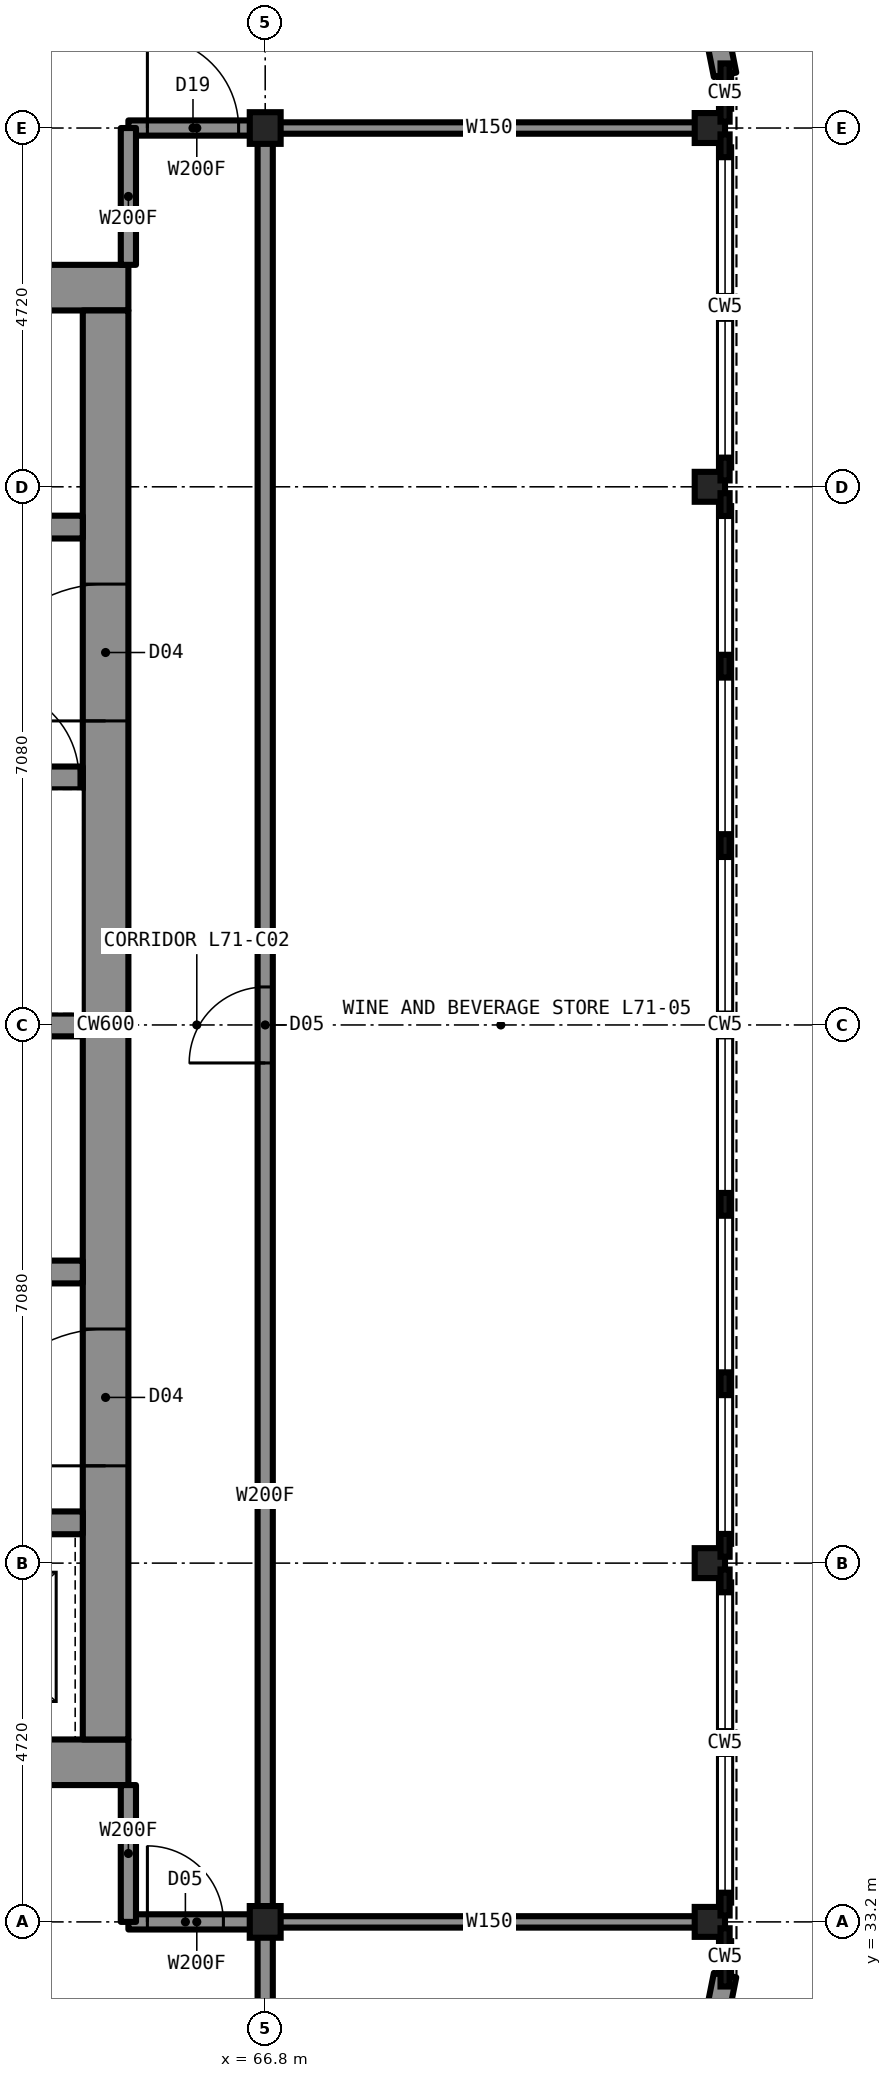
"""IFC4 building model, lengths in metres.
Left out: names, types, materials, properties, quantities, classifications, styles, units other than length and angle.
Written with IfcOpenShell. Run it as: python <this file> out.ifc"""

import sys

from ifc_helpers import new_model, si_unit, direction, frame, frame_2d, origin, origin_2d, place, context, subcontext, project, spatial, rectangle, i_section, extrude, element, fill, save


model = new_model("IFC4")
c1 = context("Model", 3, precision=1e-05, world=origin(), true_north=direction((0.0, 1.0)))
c2 = subcontext(c1, "Body", "Model", "MODEL_VIEW")
j1 = project(units=[si_unit("LENGTHUNIT", "METRE"), si_unit("PLANEANGLEUNIT", "RADIAN")], contexts=[c1])
p1 = place(None, origin())
s1 = spatial("IfcSite", under=j1, at=p1, CompositionType="ELEMENT")
p2 = place(p1, origin())
s2 = spatial("IfcBuilding", under=s1, at=p2, CompositionType="ELEMENT")
p3 = place(p2, frame((0.0, 0.0, 261.7)))
s3 = spatial("IfcBuildingStorey", under=s2, at=p3, CompositionType="ELEMENT", Elevation=261.7)
for number, where, z_axis, x_axis in (
    (1, (72.65, 33.2, 0.0), (0.0, 0.0, 1.0), (1.0, 0.0, 0.0)),
    (2, (72.65, 37.92, 0.0), (0.0, 0.0, 1.0), (1.0, 0.0, 0.0)),
    (3, (72.65, 52.08, 0.0), (0.0, 0.0, 1.0), (1.0, 0.0, 0.0)),
    (4, (72.65, 56.8, 0.0), (0.0, 0.0, 1.0), (1.0, 0.0, 0.0)),
):
    element("IfcColumn", number, at=place(p3, frame(where, z_axis=z_axis, x_axis=x_axis)), inside=s3, PredefinedType="COLUMN", context=c2, shape_type="SweptSolid", body=[
        extrude(i_section(OverallWidth=0.399, OverallDepth=0.394, WebThickness=0.023, FlangeThickness=0.037, at=origin_2d()), origin(), (0.0, 0.0, 1.0), 5.0),
    ])
for number, where, z_axis, x_axis in (
    (5, (66.8, 33.2, 0.0), (0.0, 0.0, 1.0), (1.0, 0.0, 0.0)),
    (6, (66.8, 56.8, 0.0), (0.0, 0.0, 1.0), (1.0, 0.0, 0.0)),
):
    element("IfcColumn", number, at=place(p3, frame(where, z_axis=z_axis, x_axis=x_axis)), inside=s3, PredefinedType="COLUMN", context=c2, shape_type="SweptSolid", body=[
        extrude(i_section(OverallWidth=0.406, OverallDepth=0.417, WebThickness=0.03, FlangeThickness=0.048, at=origin_2d()), origin(), (0.0, 0.0, 1.0), 5.0),
    ])
for number, where, z_axis, x_axis in (
    (7, (45.0, 54.7, 0.0), (0.0, 0.0, 1.0), (1.0, 0.0, 0.0)),
    (8, (45.0, 35.3, 0.0), (0.0, 0.0, 1.0), (1.0, 0.0, 0.0)),
):
    element("IfcWall", number, at=place(p3, frame(where, z_axis=z_axis, x_axis=x_axis)), inside=s3, PredefinedType="SHEAR", context=c2, shape_type="SweptSolid", body=[
        extrude(rectangle(XDim=20.0, YDim=0.6, at=frame_2d((10.0, 0.0))), origin(), (0.0, 0.0, 1.0), 5.0),
    ])
p4 = place(p3, frame((64.7, 35.6, 0.0), z_axis=(0.0, 0.0, 1.0), x_axis=(0.0, 1.0, 0.0)))
e9 = element("IfcWall", 9, at=p4, inside=s3, PredefinedType="SHEAR", context=c2, shape_type="SweptSolid", body=[
    extrude(rectangle(XDim=18.8, YDim=0.6, at=frame_2d((9.4, 0.0))), origin(), (0.0, 0.0, 1.0), 5.0),
])
p5 = place(p4, frame((13.4, 0.0, 0.0)))
e10 = element("IfcOpeningElement", 10, at=p5, cuts=e9, PredefinedType="OPENING", context=c2, shape_type="SweptSolid", body=[
    extrude(rectangle(XDim=1.8, YDim=2.2, at=frame_2d((0.9, 1.1))), frame((0.0, 0.31, 0.0), z_axis=(0.0, -1.0, 0.0), x_axis=(1.0, 0.0, 0.0)), (0.0, 0.0, 1.0), 0.62),
])
p6 = place(p4, frame((3.6, 0.0, 0.0)))
e11 = element("IfcOpeningElement", 11, at=p6, cuts=e9, PredefinedType="OPENING", context=c2, shape_type="SweptSolid", body=[
    extrude(rectangle(XDim=1.8, YDim=2.2, at=frame_2d((0.9, 1.1))), frame((0.0, 0.31, 0.0), z_axis=(0.0, -1.0, 0.0), x_axis=(1.0, 0.0, 0.0)), (0.0, 0.0, 1.0), 0.62),
])
p7 = place(p3, frame((45.6, 51.55, 0.0), z_axis=(0.0, 0.0, 1.0), x_axis=(1.0, 0.0, 0.0)))
e12 = element("IfcWall", 12, at=p7, inside=s3, PredefinedType="SHEAR", context=c2, shape_type="SweptSolid", body=[
    extrude(rectangle(XDim=18.8, YDim=0.3, at=frame_2d((9.4, 0.0))), origin(), (0.0, 0.0, 1.0), 5.0),
])
p8 = place(p7, frame((4.8, 0.0, 0.0)))
e13 = element("IfcOpeningElement", 13, at=p8, cuts=e12, PredefinedType="OPENING", context=c2, shape_type="SweptSolid", body=[
    extrude(rectangle(XDim=1.0, YDim=2.1, at=frame_2d((0.5, 1.05))), frame((0.0, 0.16, 0.0), z_axis=(0.0, -1.0, 0.0), x_axis=(1.0, 0.0, 0.0)), (0.0, 0.0, 1.0), 0.32),
])
p9 = place(p7, frame((11.6, 0.0, 0.0)))
e14 = element("IfcOpeningElement", 14, at=p9, cuts=e12, PredefinedType="OPENING", context=c2, shape_type="SweptSolid", body=[
    extrude(rectangle(XDim=1.1, YDim=2.2, at=frame_2d((0.55, 1.1))), frame((0.0, 0.16, 0.0), z_axis=(0.0, -1.0, 0.0), x_axis=(1.0, 0.0, 0.0)), (0.0, 0.0, 1.0), 0.32),
])
p10 = place(p7, frame((14.3, 0.0, 0.0)))
e15 = element("IfcOpeningElement", 15, at=p10, cuts=e12, PredefinedType="OPENING", context=c2, shape_type="SweptSolid", body=[
    extrude(rectangle(XDim=1.1, YDim=2.2, at=frame_2d((0.55, 1.1))), frame((0.0, 0.16, 0.0), z_axis=(0.0, -1.0, 0.0), x_axis=(1.0, 0.0, 0.0)), (0.0, 0.0, 1.0), 0.32),
])
p11 = place(p3, frame((45.6, 38.45, 0.0), z_axis=(0.0, 0.0, 1.0), x_axis=(1.0, 0.0, 0.0)))
e16 = element("IfcWall", 16, at=p11, inside=s3, PredefinedType="SHEAR", context=c2, shape_type="SweptSolid", body=[
    extrude(rectangle(XDim=18.8, YDim=0.3, at=frame_2d((9.4, 0.0))), origin(), (0.0, 0.0, 1.0), 5.0),
])
p12 = place(p11, frame((11.5, 0.0, 0.0)))
e17 = element("IfcOpeningElement", 17, at=p12, cuts=e16, PredefinedType="OPENING", context=c2, shape_type="SweptSolid", body=[
    extrude(rectangle(XDim=1.1, YDim=2.2, at=frame_2d((0.55, 1.1))), frame((0.0, 0.16, 0.0), z_axis=(0.0, -1.0, 0.0), x_axis=(1.0, 0.0, 0.0)), (0.0, 0.0, 1.0), 0.32),
])
p13 = place(p11, frame((14.2, 0.0, 0.0)))
e18 = element("IfcOpeningElement", 18, at=p13, cuts=e16, PredefinedType="OPENING", context=c2, shape_type="SweptSolid", body=[
    extrude(rectangle(XDim=1.1, YDim=2.2, at=frame_2d((0.55, 1.1))), frame((0.0, 0.16, 0.0), z_axis=(0.0, -1.0, 0.0), x_axis=(1.0, 0.0, 0.0)), (0.0, 0.0, 1.0), 0.32),
])
p14 = place(p11, frame((16.9, 0.0, 0.0)))
e19 = element("IfcOpeningElement", 19, at=p14, cuts=e16, PredefinedType="OPENING", context=c2, shape_type="SweptSolid", body=[
    extrude(rectangle(XDim=1.1, YDim=2.2, at=frame_2d((0.55, 1.1))), frame((0.0, 0.16, 0.0), z_axis=(0.0, -1.0, 0.0), x_axis=(1.0, 0.0, 0.0)), (0.0, 0.0, 1.0), 0.32),
])
p15 = place(p3, frame((56.2, 48.25, 0.0), z_axis=(0.0, 0.0, 1.0), x_axis=(1.0, 0.0, 0.0)))
e20 = element("IfcWall", 20, at=p15, inside=s3, PredefinedType="SHEAR", context=c2, shape_type="SweptSolid", body=[
    extrude(rectangle(XDim=8.2, YDim=0.3, at=frame_2d((4.1, 0.0))), origin(), (0.0, 0.0, 1.0), 5.0),
])
p16 = place(p15, frame((6.95, 0.0, 0.0)))
e21 = element("IfcOpeningElement", 21, at=p16, cuts=e20, PredefinedType="OPENING", context=c2, shape_type="SweptSolid", body=[
    extrude(rectangle(XDim=1.2, YDim=2.2, at=frame_2d((0.6, 1.1))), frame((0.0, 0.16, 0.0), z_axis=(0.0, -1.0, 0.0), x_axis=(1.0, 0.0, 0.0)), (0.0, 0.0, 1.0), 0.32),
])
p17 = place(p3, frame((56.2, 41.75, 0.0), z_axis=(0.0, 0.0, 1.0), x_axis=(1.0, 0.0, 0.0)))
e22 = element("IfcWall", 22, at=p17, inside=s3, PredefinedType="SHEAR", context=c2, shape_type="SweptSolid", body=[
    extrude(rectangle(XDim=8.2, YDim=0.3, at=frame_2d((4.1, 0.0))), origin(), (0.0, 0.0, 1.0), 5.0),
])
p18 = place(p17, frame((3.3, 0.0, 0.0)))
e23 = element("IfcOpeningElement", 23, at=p18, cuts=e22, PredefinedType="OPENING", context=c2, shape_type="SweptSolid", body=[
    extrude(rectangle(XDim=1.0, YDim=2.1, at=frame_2d((0.5, 1.05))), frame((0.0, 0.16, 0.0), z_axis=(0.0, -1.0, 0.0), x_axis=(1.0, 0.0, 0.0)), (0.0, 0.0, 1.0), 0.32),
])
p19 = place(p3, frame((56.5, 45.0, 0.0), z_axis=(0.0, 0.0, 1.0), x_axis=(1.0, 0.0, 0.0)))
e24 = element("IfcWall", 24, at=p19, inside=s3, PredefinedType="SHEAR", context=c2, shape_type="SweptSolid", body=[
    extrude(rectangle(XDim=7.9, YDim=0.3, at=frame_2d((3.95, 0.0))), origin(), (0.0, 0.0, 1.0), 5.0),
])
p20 = place(p3, frame((65.0, 33.2, 0.0), z_axis=(0.0, 0.0, 1.0), x_axis=(1.0, 0.0, 0.0)))
e25 = element("IfcWall", 25, at=p20, inside=s3, PredefinedType="PARTITIONING", context=c2, shape_type="SweptSolid", body=[
    extrude(rectangle(XDim=1.8, YDim=0.2, at=frame_2d((0.9, 0.0))), origin(), (0.0, 0.0, 1.0), 4.83),
])
p21 = place(p20, frame((0.25, 0.0, 0.0)))
e26 = element("IfcOpeningElement", 26, at=p21, cuts=e25, PredefinedType="OPENING", context=c2, shape_type="SweptSolid", body=[
    extrude(rectangle(XDim=1.0, YDim=2.1, at=frame_2d((0.5, 1.05))), frame((0.0, 0.11, 0.0), z_axis=(0.0, -1.0, 0.0), x_axis=(1.0, 0.0, 0.0)), (0.0, 0.0, 1.0), 0.22),
])
p22 = place(p3, frame((66.8, 33.2, 0.0), z_axis=(0.0, 0.0, 1.0), x_axis=(1.0, 0.0, 0.0)))
e27 = element("IfcWall", 27, at=p22, inside=s3, PredefinedType="PARTITIONING", context=c2, shape_type="SweptSolid", body=[
    extrude(rectangle(XDim=5.9, YDim=0.15, at=frame_2d((2.95, 0.0))), origin(), (0.0, 0.0, 1.0), 4.068),
])
p23 = place(p3, frame((65.0, 56.8, 0.0), z_axis=(0.0, 0.0, 1.0), x_axis=(1.0, 0.0, 0.0)))
e28 = element("IfcWall", 28, at=p23, inside=s3, PredefinedType="PARTITIONING", context=c2, shape_type="SweptSolid", body=[
    extrude(rectangle(XDim=1.8, YDim=0.2, at=frame_2d((0.9, 0.0))), origin(), (0.0, 0.0, 1.0), 4.83),
])
p24 = place(p23, frame((0.25, 0.0, 0.0)))
e29 = element("IfcOpeningElement", 29, at=p24, cuts=e28, PredefinedType="OPENING", context=c2, shape_type="SweptSolid", body=[
    extrude(rectangle(XDim=1.2, YDim=2.2, at=frame_2d((0.6, 1.1))), frame((0.0, 0.11, 0.0), z_axis=(0.0, -1.0, 0.0), x_axis=(1.0, 0.0, 0.0)), (0.0, 0.0, 1.0), 0.22),
])
p25 = place(p3, frame((66.8, 56.8, 0.0), z_axis=(0.0, 0.0, 1.0), x_axis=(1.0, 0.0, 0.0)))
e30 = element("IfcWall", 30, at=p25, inside=s3, PredefinedType="PARTITIONING", context=c2, shape_type="SweptSolid", body=[
    extrude(rectangle(XDim=5.9, YDim=0.15, at=frame_2d((2.95, 0.0))), origin(), (0.0, 0.0, 1.0), 4.068),
])
for number, where, z_axis, x_axis in (
    (31, (65.0, 33.2, 0.0), (0.0, 0.0, 1.0), (0.0, 1.0, 0.0)),
    (32, (65.0, 55.0, 0.0), (0.0, 0.0, 1.0), (0.0, 1.0, 0.0)),
):
    element("IfcWall", number, at=place(p3, frame(where, z_axis=z_axis, x_axis=x_axis)), inside=s3, PredefinedType="PARTITIONING", context=c2, shape_type="SweptSolid", body=[
        extrude(rectangle(XDim=1.8, YDim=0.2, at=frame_2d((0.9, 0.0))), origin(), (0.0, 0.0, 1.0), 4.83),
    ])
p26 = place(p3, frame((66.8, 33.2, 0.0), z_axis=(0.0, 0.0, 1.0), x_axis=(0.0, 1.0, 0.0)))
e33 = element("IfcWall", 33, at=p26, inside=s3, PredefinedType="PARTITIONING", context=c2, shape_type="SweptSolid", body=[
    extrude(rectangle(XDim=23.6, YDim=0.2, at=frame_2d((11.8, 0.0))), origin(), (0.0, 0.0, 1.0), 4.83),
])
p27 = place(p26, frame((11.3, 0.0, 0.0)))
e34 = element("IfcOpeningElement", 34, at=p27, cuts=e33, PredefinedType="OPENING", context=c2, shape_type="SweptSolid", body=[
    extrude(rectangle(XDim=1.0, YDim=2.1, at=frame_2d((0.5, 1.05))), frame((0.0, 0.11, 0.0), z_axis=(0.0, -1.0, 0.0), x_axis=(1.0, 0.0, 0.0)), (0.0, 0.0, 1.0), 0.22),
])
p28 = place(p3, frame((66.8, 27.3, 0.0), z_axis=(0.0, 0.0, 1.0), x_axis=(0.0, 1.0, 0.0)))
e35 = element("IfcWall", 35, at=p28, inside=s3, PredefinedType="PARTITIONING", context=c2, shape_type="SweptSolid", body=[
    extrude(rectangle(XDim=5.9, YDim=0.2, at=frame_2d((2.95, 0.0))), origin(), (0.0, 0.0, 1.0), 4.068),
])
p29 = place(p28, frame((2.2, 0.0, 0.0)))
e36 = element("IfcOpeningElement", 36, at=p29, cuts=e35, PredefinedType="OPENING", context=c2, shape_type="SweptSolid", body=[
    extrude(rectangle(XDim=1.0, YDim=2.1, at=frame_2d((0.5, 1.05))), frame((0.0, 0.11, 0.0), z_axis=(0.0, -1.0, 0.0), x_axis=(1.0, 0.0, 0.0)), (0.0, 0.0, 1.0), 0.22),
])
for number, where, z_axis, x_axis in (
    (37, (72.443, 30.453, 0.0), (0.0, 0.0, 1.0), (0.195, 0.981, 0.0)),
    (38, (72.85, 57.5, 0.0), (0.0, 0.0, 1.0), (-0.195, 0.981, 0.0)),
):
    element("IfcWall", number, at=place(p3, frame(where, z_axis=z_axis, x_axis=x_axis)), inside=s3, PredefinedType="SOLIDWALL", context=c2, shape_type="SweptSolid", body=[
        extrude(rectangle(XDim=2.087, YDim=0.3, at=frame_2d((1.044, 0.0))), origin(), (0.0, 0.0, 1.0), 4.83),
    ])
p30 = place(p24, origin())
e39 = element("IfcDoor", 39, at=p30, inside=s3, OperationType="SINGLE_SWING_LEFT", PredefinedType="DOOR", context=c2, shape_type="SweptSolid", body=[
    extrude(rectangle(XDim=1.2, YDim=2.2, at=frame_2d((0.6, 1.1))), frame((0.0, 0.025, 0.0), z_axis=(0.0, -1.0, 0.0), x_axis=(1.0, 0.0, 0.0)), (0.0, 0.0, 1.0), 0.05),
])
fill(e29, e39)
p31 = place(p21, origin())
e40 = element("IfcDoor", 40, at=p31, inside=s3, OperationType="SINGLE_SWING_LEFT", PredefinedType="DOOR", context=c2, shape_type="SweptSolid", body=[
    extrude(rectangle(XDim=1.0, YDim=2.1, at=frame_2d((0.5, 1.05))), frame((0.0, 0.025, 0.0), z_axis=(0.0, -1.0, 0.0), x_axis=(1.0, 0.0, 0.0)), (0.0, 0.0, 1.0), 0.05),
])
fill(e26, e40)
p32 = place(p27, origin())
e41 = element("IfcDoor", 41, at=p32, inside=s3, OperationType="SINGLE_SWING_LEFT", PredefinedType="DOOR", context=c2, shape_type="SweptSolid", body=[
    extrude(rectangle(XDim=1.0, YDim=2.1, at=frame_2d((0.5, 1.05))), frame((0.0, 0.025, 0.0), z_axis=(0.0, -1.0, 0.0), x_axis=(1.0, 0.0, 0.0)), (0.0, 0.0, 1.0), 0.05),
])
fill(e34, e41)
p33 = place(p5, origin())
e42 = element("IfcDoor", 42, at=p33, inside=s3, OperationType="DOUBLE_DOOR_SINGLE_SWING", PredefinedType="DOOR", context=c2, shape_type="SweptSolid", body=[
    extrude(rectangle(XDim=1.8, YDim=2.2, at=frame_2d((0.9, 1.1))), frame((0.0, 0.025, 0.0), z_axis=(0.0, -1.0, 0.0), x_axis=(1.0, 0.0, 0.0)), (0.0, 0.0, 1.0), 0.05),
])
fill(e10, e42)
p34 = place(p6, origin())
e43 = element("IfcDoor", 43, at=p34, inside=s3, OperationType="DOUBLE_DOOR_SINGLE_SWING", PredefinedType="DOOR", context=c2, shape_type="SweptSolid", body=[
    extrude(rectangle(XDim=1.8, YDim=2.2, at=frame_2d((0.9, 1.1))), frame((0.0, 0.025, 0.0), z_axis=(0.0, -1.0, 0.0), x_axis=(1.0, 0.0, 0.0)), (0.0, 0.0, 1.0), 0.05),
])
fill(e11, e43)
p35 = place(p16, origin())
e44 = element("IfcDoor", 44, at=p35, inside=s3, OperationType="SINGLE_SWING_LEFT", PredefinedType="DOOR", context=c2, shape_type="SweptSolid", body=[
    extrude(rectangle(XDim=1.2, YDim=2.2, at=frame_2d((0.6, 1.1))), frame((0.0, 0.025, 0.0), z_axis=(0.0, -1.0, 0.0), x_axis=(1.0, 0.0, 0.0)), (0.0, 0.0, 1.0), 0.05),
])
fill(e21, e44)
save(model, sys.argv[1])
